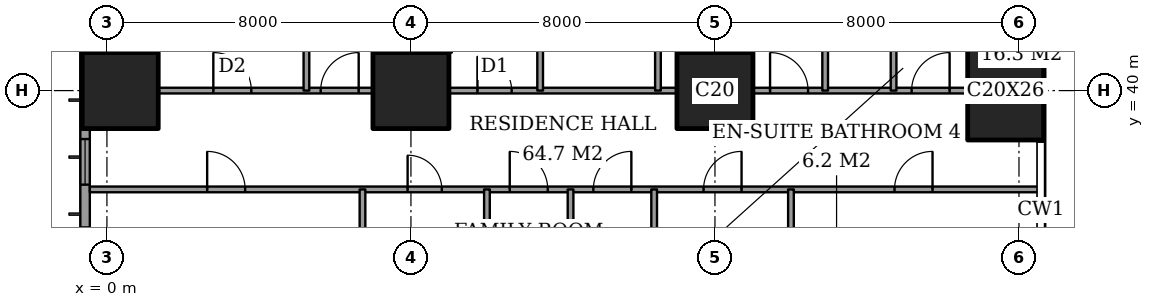
"""IFC4 building model, lengths in metres.
Left out: names, types, materials, properties, quantities, classifications, styles, units other than length and angle.
Written with IfcOpenShell. Run it as: python <this file> out.ifc"""

import sys

from ifc_helpers import new_model, si_unit, direction, frame, frame_2d, origin, origin_2d, place, context, subcontext, project, spatial, rectangle, extrude, element, fill, save


model = new_model("IFC4")
c1 = context("Model", 3, precision=1e-05, world=origin(), true_north=direction((0.0, 1.0)))
c2 = subcontext(c1, "Body", "Model", "MODEL_VIEW")
j1 = project(units=[si_unit("LENGTHUNIT", "METRE"), si_unit("PLANEANGLEUNIT", "RADIAN")], contexts=[c1])
p1 = place(None, origin())
s1 = spatial("IfcSite", under=j1, at=p1, CompositionType="ELEMENT")
p2 = place(p1, origin())
s2 = spatial("IfcBuilding", under=s1, at=p2, CompositionType="ELEMENT")
p3 = place(p2, frame((0.0, 0.0, 103.4)))
s3 = spatial("IfcBuildingStorey", under=s2, at=p3, CompositionType="ELEMENT", Elevation=103.4)
for number, where, z_axis, x_axis in (
    (1, (0.35, 40.0, 0.0), (0.0, 0.0, 1.0), (1.0, 0.0, 0.0)),
    (2, (8.0, 40.0, 0.0), (0.0, 0.0, 1.0), (1.0, 0.0, 0.0)),
    (3, (16.0, 40.0, 0.0), (0.0, 0.0, 1.0), (1.0, 0.0, 0.0)),
):
    element("IfcColumn", number, at=place(p3, frame(where, z_axis=z_axis, x_axis=x_axis)), inside=s3, PredefinedType="COLUMN", context=c2, shape_type="SweptSolid", body=[
        extrude(rectangle(XDim=2.0, YDim=2.0, at=origin_2d()), origin(), (0.0, 0.0, 1.0), 3.6),
    ])
p4 = place(p3, frame((23.65, 40.0, 0.0), z_axis=(0.0, 0.0, 1.0), x_axis=(1.0, 0.0, 0.0)))
e4 = element("IfcColumn", 4, at=p4, inside=s3, PredefinedType="COLUMN", context=c2, shape_type="SweptSolid", body=[
    extrude(rectangle(XDim=2.0, YDim=2.6, at=origin_2d()), origin(), (0.0, 0.0, 1.0), 3.6),
])
p5 = place(p3, frame((-0.575, 44.825, 0.0), z_axis=(0.0, 0.0, 1.0), x_axis=(0.0, -1.0, 0.0)))
e5 = element("IfcWall", 5, at=p5, inside=s3, PredefinedType="SOLIDWALL", context=c2, shape_type="SweptSolid", body=[
    extrude(rectangle(XDim=41.65, YDim=0.25, at=frame_2d((20.825, 0.0))), origin(), (0.0, 0.0, 1.0), 3.6),
])
p6 = place(p5, frame((0.775, 0.0, 0.4)))
e6 = element("IfcOpeningElement", 6, at=p6, cuts=e5, PredefinedType="OPENING", context=c2, shape_type="SweptSolid", body=[
    extrude(rectangle(XDim=2.4, YDim=2.2, at=frame_2d((1.2, 1.1))), frame((0.0, 0.135, 0.0), z_axis=(0.0, -1.0, 0.0), x_axis=(1.0, 0.0, 0.0)), (0.0, 0.0, 1.0), 0.27),
])
p7 = place(p5, frame((6.1, 0.0, 0.4)))
e7 = element("IfcOpeningElement", 7, at=p7, cuts=e5, PredefinedType="OPENING", context=c2, shape_type="SweptSolid", body=[
    extrude(rectangle(XDim=1.2, YDim=2.2, at=frame_2d((0.6, 1.1))), frame((0.0, 0.135, 0.0), z_axis=(0.0, -1.0, 0.0), x_axis=(1.0, 0.0, 0.0)), (0.0, 0.0, 1.0), 0.27),
])
p8 = place(p5, frame((8.425, 0.0, 0.4)))
e8 = element("IfcOpeningElement", 8, at=p8, cuts=e5, PredefinedType="OPENING", context=c2, shape_type="SweptSolid", body=[
    extrude(rectangle(XDim=2.4, YDim=2.2, at=frame_2d((1.2, 1.1))), frame((0.0, 0.135, 0.0), z_axis=(0.0, -1.0, 0.0), x_axis=(1.0, 0.0, 0.0)), (0.0, 0.0, 1.0), 0.27),
])
p9 = place(p5, frame((15.625, 0.0, 0.4)))
e9 = element("IfcOpeningElement", 9, at=p9, cuts=e5, PredefinedType="OPENING", context=c2, shape_type="SweptSolid", body=[
    extrude(rectangle(XDim=2.4, YDim=2.2, at=frame_2d((1.2, 1.1))), frame((0.0, 0.135, 0.0), z_axis=(0.0, -1.0, 0.0), x_axis=(1.0, 0.0, 0.0)), (0.0, 0.0, 1.0), 0.27),
])
p10 = place(p5, frame((23.625, 0.0, 0.4)))
e10 = element("IfcOpeningElement", 10, at=p10, cuts=e5, PredefinedType="OPENING", context=c2, shape_type="SweptSolid", body=[
    extrude(rectangle(XDim=2.4, YDim=2.2, at=frame_2d((1.2, 1.1))), frame((0.0, 0.135, 0.0), z_axis=(0.0, -1.0, 0.0), x_axis=(1.0, 0.0, 0.0)), (0.0, 0.0, 1.0), 0.27),
])
p11 = place(p5, frame((30.725, 0.0, 0.4)))
e11 = element("IfcOpeningElement", 11, at=p11, cuts=e5, PredefinedType="OPENING", context=c2, shape_type="SweptSolid", body=[
    extrude(rectangle(XDim=2.4, YDim=2.2, at=frame_2d((1.2, 1.1))), frame((0.0, 0.135, 0.0), z_axis=(0.0, -1.0, 0.0), x_axis=(1.0, 0.0, 0.0)), (0.0, 0.0, 1.0), 0.27),
])
p12 = place(p5, frame((34.325, 0.0, 0.4)))
e12 = element("IfcOpeningElement", 12, at=p12, cuts=e5, PredefinedType="OPENING", context=c2, shape_type="SweptSolid", body=[
    extrude(rectangle(XDim=1.2, YDim=2.2, at=frame_2d((0.6, 1.1))), frame((0.0, 0.135, 0.0), z_axis=(0.0, -1.0, 0.0), x_axis=(1.0, 0.0, 0.0)), (0.0, 0.0, 1.0), 0.27),
])
p13 = place(p5, frame((38.475, 0.0, 0.4)))
e13 = element("IfcOpeningElement", 13, at=p13, cuts=e5, PredefinedType="OPENING", context=c2, shape_type="SweptSolid", body=[
    extrude(rectangle(XDim=2.4, YDim=2.2, at=frame_2d((1.2, 1.1))), frame((0.0, 0.135, 0.0), z_axis=(0.0, -1.0, 0.0), x_axis=(1.0, 0.0, 0.0)), (0.0, 0.0, 1.0), 0.27),
])
p14 = place(p3, frame((-0.45, 37.4, 0.0), z_axis=(0.0, 0.0, 1.0), x_axis=(1.0, 0.0, 0.0)))
e14 = element("IfcWall", 14, at=p14, inside=s3, PredefinedType="PARTITIONING", context=c2, shape_type="SweptSolid", body=[
    extrude(rectangle(XDim=25.011, YDim=0.15, at=frame_2d((12.505, 0.0))), origin(), (0.0, 0.0, 1.0), 3.35),
])
p15 = place(p14, frame((13.25, 0.0, 0.0)))
e15 = element("IfcOpeningElement", 15, at=p15, cuts=e14, PredefinedType="OPENING", context=c2, shape_type="SweptSolid", body=[
    extrude(rectangle(XDim=1.0, YDim=2.1, at=frame_2d((0.5, 1.05))), frame((0.0, 0.085, 0.0), z_axis=(0.0, -1.0, 0.0), x_axis=(1.0, 0.0, 0.0)), (0.0, 0.0, 1.0), 0.17),
])
p16 = place(p14, frame((3.087, 0.0, 0.0)))
e16 = element("IfcOpeningElement", 16, at=p16, cuts=e14, PredefinedType="OPENING", context=c2, shape_type="SweptSolid", body=[
    extrude(rectangle(XDim=1.0, YDim=2.1, at=frame_2d((0.5, 1.05))), frame((0.0, 0.085, 0.0), z_axis=(0.0, -1.0, 0.0), x_axis=(1.0, 0.0, 0.0)), (0.0, 0.0, 1.0), 0.17),
])
p17 = place(p14, frame((8.363, 0.0, 0.0)))
e17 = element("IfcOpeningElement", 17, at=p17, cuts=e14, PredefinedType="OPENING", context=c2, shape_type="SweptSolid", body=[
    extrude(rectangle(XDim=0.9, YDim=2.1, at=frame_2d((0.45, 1.05))), frame((0.0, 0.085, 0.0), z_axis=(0.0, -1.0, 0.0), x_axis=(1.0, 0.0, 0.0)), (0.0, 0.0, 1.0), 0.17),
])
p18 = place(p14, frame((11.05, 0.0, 0.0)))
e18 = element("IfcOpeningElement", 18, at=p18, cuts=e14, PredefinedType="OPENING", context=c2, shape_type="SweptSolid", body=[
    extrude(rectangle(XDim=1.0, YDim=2.1, at=frame_2d((0.5, 1.05))), frame((0.0, 0.085, 0.0), z_axis=(0.0, -1.0, 0.0), x_axis=(1.0, 0.0, 0.0)), (0.0, 0.0, 1.0), 0.17),
])
p19 = place(p14, frame((16.15, 0.0, 0.0)))
e19 = element("IfcOpeningElement", 19, at=p19, cuts=e14, PredefinedType="OPENING", context=c2, shape_type="SweptSolid", body=[
    extrude(rectangle(XDim=1.0, YDim=2.1, at=frame_2d((0.5, 1.05))), frame((0.0, 0.085, 0.0), z_axis=(0.0, -1.0, 0.0), x_axis=(1.0, 0.0, 0.0)), (0.0, 0.0, 1.0), 0.17),
])
p20 = place(p14, frame((21.175, 0.0, 0.0)))
e20 = element("IfcOpeningElement", 20, at=p20, cuts=e14, PredefinedType="OPENING", context=c2, shape_type="SweptSolid", body=[
    extrude(rectangle(XDim=1.0, YDim=2.1, at=frame_2d((0.5, 1.05))), frame((0.0, 0.085, 0.0), z_axis=(0.0, -1.0, 0.0), x_axis=(1.0, 0.0, 0.0)), (0.0, 0.0, 1.0), 0.17),
])
p21 = place(p3, frame((1.35, 40.0, 0.0), z_axis=(0.0, 0.0, 1.0), x_axis=(1.0, 0.0, 0.0)))
e21 = element("IfcWall", 21, at=p21, inside=s3, PredefinedType="PARTITIONING", context=c2, shape_type="SweptSolid", body=[
    extrude(rectangle(XDim=5.65, YDim=0.15, at=frame_2d((2.825, 0.0))), origin(), (0.0, 0.0, 1.0), 3.35),
])
p22 = place(p21, frame((1.45, 0.0, 0.0)))
e22 = element("IfcOpeningElement", 22, at=p22, cuts=e21, PredefinedType="OPENING", context=c2, shape_type="SweptSolid", body=[
    extrude(rectangle(XDim=1.0, YDim=2.1, at=frame_2d((0.5, 1.05))), frame((0.0, 0.085, 0.0), z_axis=(0.0, -1.0, 0.0), x_axis=(1.0, 0.0, 0.0)), (0.0, 0.0, 1.0), 0.17),
])
p23 = place(p21, frame((4.275, 0.0, 0.0)))
e23 = element("IfcOpeningElement", 23, at=p23, cuts=e21, PredefinedType="OPENING", context=c2, shape_type="SweptSolid", body=[
    extrude(rectangle(XDim=1.0, YDim=2.1, at=frame_2d((0.5, 1.05))), frame((0.0, 0.085, 0.0), z_axis=(0.0, -1.0, 0.0), x_axis=(1.0, 0.0, 0.0)), (0.0, 0.0, 1.0), 0.17),
])
p24 = place(p3, frame((9.0, 40.0, 0.0), z_axis=(0.0, 0.0, 1.0), x_axis=(1.0, 0.0, 0.0)))
e24 = element("IfcWall", 24, at=p24, inside=s3, PredefinedType="PARTITIONING", context=c2, shape_type="SweptSolid", body=[
    extrude(rectangle(XDim=6.0, YDim=0.15, at=frame_2d((3.0, 0.0))), origin(), (0.0, 0.0, 1.0), 3.35),
])
p25 = place(p24, frame((0.75, 0.0, 0.0)))
e25 = element("IfcOpeningElement", 25, at=p25, cuts=e24, PredefinedType="OPENING", context=c2, shape_type="SweptSolid", body=[
    extrude(rectangle(XDim=0.9, YDim=2.1, at=frame_2d((0.45, 1.05))), frame((0.0, 0.085, 0.0), z_axis=(0.0, -1.0, 0.0), x_axis=(1.0, 0.0, 0.0)), (0.0, 0.0, 1.0), 0.17),
])
p26 = place(p3, frame((17.0, 40.0, 0.0), z_axis=(0.0, 0.0, 1.0), x_axis=(1.0, 0.0, 0.0)))
e26 = element("IfcWall", 26, at=p26, inside=s3, PredefinedType="PARTITIONING", context=c2, shape_type="SweptSolid", body=[
    extrude(rectangle(XDim=5.65, YDim=0.15, at=frame_2d((2.825, 0.0))), origin(), (0.0, 0.0, 1.0), 3.35),
])
p27 = place(p26, frame((0.45, 0.0, 0.0)))
e27 = element("IfcOpeningElement", 27, at=p27, cuts=e26, PredefinedType="OPENING", context=c2, shape_type="SweptSolid", body=[
    extrude(rectangle(XDim=1.0, YDim=2.1, at=frame_2d((0.5, 1.05))), frame((0.0, 0.085, 0.0), z_axis=(0.0, -1.0, 0.0), x_axis=(1.0, 0.0, 0.0)), (0.0, 0.0, 1.0), 0.17),
])
p28 = place(p26, frame((4.175, 0.0, 0.0)))
e28 = element("IfcOpeningElement", 28, at=p28, cuts=e26, PredefinedType="OPENING", context=c2, shape_type="SweptSolid", body=[
    extrude(rectangle(XDim=1.0, YDim=2.1, at=frame_2d((0.5, 1.05))), frame((0.0, 0.085, 0.0), z_axis=(0.0, -1.0, 0.0), x_axis=(1.0, 0.0, 0.0)), (0.0, 0.0, 1.0), 0.17),
])
p29 = place(p3, frame((5.25, 40.0, 0.0), z_axis=(0.0, 0.0, 1.0), x_axis=(0.0, 1.0, 0.0)))
e29 = element("IfcWall", 29, at=p29, inside=s3, PredefinedType="PARTITIONING", context=c2, shape_type="SweptSolid", body=[
    extrude(rectangle(XDim=8.45, YDim=0.15, at=frame_2d((4.225, 0.0))), origin(), (0.0, 0.0, 1.0), 3.35),
])
p30 = place(p3, frame((6.725, 33.2, 0.0), z_axis=(0.0, 0.0, 1.0), x_axis=(0.0, 1.0, 0.0)))
e30 = element("IfcWall", 30, at=p30, inside=s3, PredefinedType="PARTITIONING", context=c2, shape_type="SweptSolid", body=[
    extrude(rectangle(XDim=4.2, YDim=0.15, at=frame_2d((2.1, 0.0))), origin(), (0.0, 0.0, 1.0), 3.35),
])
p31 = place(p3, frame((10.0, 28.0, 0.0), z_axis=(0.0, 0.0, 1.0), x_axis=(0.0, 1.0, 0.0)))
e31 = element("IfcWall", 31, at=p31, inside=s3, PredefinedType="PARTITIONING", context=c2, shape_type="SweptSolid", body=[
    extrude(rectangle(XDim=9.4, YDim=0.15, at=frame_2d((4.7, 0.0))), origin(), (0.0, 0.0, 1.0), 3.35),
])
p32 = place(p31, frame((0.5, 0.0, 0.0)))
e32 = element("IfcOpeningElement", 32, at=p32, cuts=e31, PredefinedType="OPENING", context=c2, shape_type="SweptSolid", body=[
    extrude(rectangle(XDim=1.0, YDim=2.1, at=frame_2d((0.5, 1.05))), frame((0.0, 0.085, 0.0), z_axis=(0.0, -1.0, 0.0), x_axis=(1.0, 0.0, 0.0)), (0.0, 0.0, 1.0), 0.17),
])
p33 = place(p3, frame((11.4, 40.0, 0.0), z_axis=(0.0, 0.0, 1.0), x_axis=(0.0, 1.0, 0.0)))
e33 = element("IfcWall", 33, at=p33, inside=s3, PredefinedType="PARTITIONING", context=c2, shape_type="SweptSolid", body=[
    extrude(rectangle(XDim=8.45, YDim=0.15, at=frame_2d((4.225, 0.0))), origin(), (0.0, 0.0, 1.0), 3.35),
])
for number, where, z_axis, x_axis in (
    (34, (12.2, 30.0, 0.0), (0.0, 0.0, 1.0), (0.0, 1.0, 0.0)),
    (35, (14.4, 30.0, 0.0), (0.0, 0.0, 1.0), (0.0, 1.0, 0.0)),
):
    element("IfcWall", number, at=place(p3, frame(where, z_axis=z_axis, x_axis=x_axis)), inside=s3, PredefinedType="PARTITIONING", context=c2, shape_type="SweptSolid", body=[
        extrude(rectangle(XDim=7.4, YDim=0.15, at=frame_2d((3.7, 0.0))), origin(), (0.0, 0.0, 1.0), 3.35),
    ])
p34 = place(p3, frame((14.5, 40.0, 0.0), z_axis=(0.0, 0.0, 1.0), x_axis=(0.0, 1.0, 0.0)))
e36 = element("IfcWall", 36, at=p34, inside=s3, PredefinedType="PARTITIONING", context=c2, shape_type="SweptSolid", body=[
    extrude(rectangle(XDim=8.45, YDim=0.15, at=frame_2d((4.225, 0.0))), origin(), (0.0, 0.0, 1.0), 3.35),
])
p35 = place(p34, frame((3.775, 0.0, 0.0)))
e37 = element("IfcOpeningElement", 37, at=p35, cuts=e36, PredefinedType="OPENING", context=c2, shape_type="SweptSolid", body=[
    extrude(rectangle(XDim=0.9, YDim=2.1, at=frame_2d((0.45, 1.05))), frame((0.0, 0.085, 0.0), z_axis=(0.0, -1.0, 0.0), x_axis=(1.0, 0.0, 0.0)), (0.0, 0.0, 1.0), 0.17),
])
p36 = place(p3, frame((18.0, 28.0, 0.0), z_axis=(0.0, 0.0, 1.0), x_axis=(0.0, 1.0, 0.0)))
e38 = element("IfcWall", 38, at=p36, inside=s3, PredefinedType="PARTITIONING", context=c2, shape_type="SweptSolid", body=[
    extrude(rectangle(XDim=9.4, YDim=0.15, at=frame_2d((4.7, 0.0))), origin(), (0.0, 0.0, 1.0), 3.35),
])
p37 = place(p36, frame((0.55, 0.0, 0.0)))
e39 = element("IfcOpeningElement", 39, at=p37, cuts=e38, PredefinedType="OPENING", context=c2, shape_type="SweptSolid", body=[
    extrude(rectangle(XDim=0.9, YDim=2.1, at=frame_2d((0.45, 1.05))), frame((0.0, 0.085, 0.0), z_axis=(0.0, -1.0, 0.0), x_axis=(1.0, 0.0, 0.0)), (0.0, 0.0, 1.0), 0.17),
])
p38 = place(p3, frame((18.9, 40.0, 0.0), z_axis=(0.0, 0.0, 1.0), x_axis=(0.0, 1.0, 0.0)))
e40 = element("IfcWall", 40, at=p38, inside=s3, PredefinedType="PARTITIONING", context=c2, shape_type="SweptSolid", body=[
    extrude(rectangle(XDim=8.45, YDim=0.15, at=frame_2d((4.225, 0.0))), origin(), (0.0, 0.0, 1.0), 3.35),
])
p39 = place(p3, frame((20.7, 40.0, 0.0), z_axis=(0.0, 0.0, 1.0), x_axis=(0.0, 1.0, 0.0)))
e41 = element("IfcWall", 41, at=p39, inside=s3, PredefinedType="PARTITIONING", context=c2, shape_type="SweptSolid", body=[
    extrude(rectangle(XDim=8.45, YDim=0.15, at=frame_2d((4.225, 0.0))), origin(), (0.0, 0.0, 1.0), 3.35),
])
p40 = place(p39, frame((3.775, 0.0, 0.0)))
e42 = element("IfcOpeningElement", 42, at=p40, cuts=e41, PredefinedType="OPENING", context=c2, shape_type="SweptSolid", body=[
    extrude(rectangle(XDim=0.9, YDim=2.1, at=frame_2d((0.45, 1.05))), frame((0.0, 0.085, 0.0), z_axis=(0.0, -1.0, 0.0), x_axis=(1.0, 0.0, 0.0)), (0.0, 0.0, 1.0), 0.17),
])
p41 = place(p7, origin())
e43 = element("IfcWindow", 43, at=p41, inside=s3, PartitioningType="SINGLE_PANEL", PredefinedType="WINDOW", context=c2, shape_type="SweptSolid", body=[
    extrude(rectangle(XDim=1.2, YDim=2.2, at=frame_2d((0.6, 1.1))), frame((0.0, 0.03, 0.0), z_axis=(0.0, -1.0, 0.0), x_axis=(1.0, 0.0, 0.0)), (0.0, 0.0, 1.0), 0.06),
])
fill(e7, e43)
p42 = place(p22, origin())
e44 = element("IfcDoor", 44, at=p42, inside=s3, OperationType="SINGLE_SWING_RIGHT", PredefinedType="DOOR", context=c2, shape_type="SweptSolid", body=[
    extrude(rectangle(XDim=1.0, YDim=2.1, at=frame_2d((0.5, 1.05))), frame((0.0, 0.025, 0.0), z_axis=(0.0, -1.0, 0.0), x_axis=(1.0, 0.0, 0.0)), (0.0, 0.0, 1.0), 0.05),
])
fill(e22, e44)
p43 = place(p23, origin())
e45 = element("IfcDoor", 45, at=p43, inside=s3, OperationType="SINGLE_SWING_LEFT", PredefinedType="DOOR", context=c2, shape_type="SweptSolid", body=[
    extrude(rectangle(XDim=1.0, YDim=2.1, at=frame_2d((0.5, 1.05))), frame((0.0, 0.025, 0.0), z_axis=(0.0, -1.0, 0.0), x_axis=(1.0, 0.0, 0.0)), (0.0, 0.0, 1.0), 0.05),
])
fill(e23, e45)
p44 = place(p25, origin())
e46 = element("IfcDoor", 46, at=p44, inside=s3, OperationType="SINGLE_SWING_RIGHT", PredefinedType="DOOR", context=c2, shape_type="SweptSolid", body=[
    extrude(rectangle(XDim=0.9, YDim=2.1, at=frame_2d((0.45, 1.05))), frame((0.0, 0.025, 0.0), z_axis=(0.0, -1.0, 0.0), x_axis=(1.0, 0.0, 0.0)), (0.0, 0.0, 1.0), 0.05),
])
fill(e25, e46)
p45 = place(p27, origin())
e47 = element("IfcDoor", 47, at=p45, inside=s3, OperationType="SINGLE_SWING_RIGHT", PredefinedType="DOOR", context=c2, shape_type="SweptSolid", body=[
    extrude(rectangle(XDim=1.0, YDim=2.1, at=frame_2d((0.5, 1.05))), frame((0.0, 0.025, 0.0), z_axis=(0.0, -1.0, 0.0), x_axis=(1.0, 0.0, 0.0)), (0.0, 0.0, 1.0), 0.05),
])
fill(e27, e47)
p46 = place(p28, origin())
e48 = element("IfcDoor", 48, at=p46, inside=s3, OperationType="SINGLE_SWING_LEFT", PredefinedType="DOOR", context=c2, shape_type="SweptSolid", body=[
    extrude(rectangle(XDim=1.0, YDim=2.1, at=frame_2d((0.5, 1.05))), frame((0.0, 0.025, 0.0), z_axis=(0.0, -1.0, 0.0), x_axis=(1.0, 0.0, 0.0)), (0.0, 0.0, 1.0), 0.05),
])
fill(e28, e48)
p47 = place(p15, origin())
e49 = element("IfcDoor", 49, at=p47, inside=s3, OperationType="SINGLE_SWING_LEFT", PredefinedType="DOOR", context=c2, shape_type="SweptSolid", body=[
    extrude(rectangle(XDim=1.0, YDim=2.1, at=frame_2d((0.5, 1.05))), frame((0.0, 0.025, 0.0), z_axis=(0.0, -1.0, 0.0), x_axis=(1.0, 0.0, 0.0)), (0.0, 0.0, 1.0), 0.05),
])
fill(e15, e49)
p48 = place(p16, origin())
e50 = element("IfcDoor", 50, at=p48, inside=s3, OperationType="SINGLE_SWING_RIGHT", PredefinedType="DOOR", context=c2, shape_type="SweptSolid", body=[
    extrude(rectangle(XDim=1.0, YDim=2.1, at=frame_2d((0.5, 1.05))), frame((0.0, 0.025, 0.0), z_axis=(0.0, -1.0, 0.0), x_axis=(1.0, 0.0, 0.0)), (0.0, 0.0, 1.0), 0.05),
])
fill(e16, e50)
p49 = place(p17, origin())
e51 = element("IfcDoor", 51, at=p49, inside=s3, OperationType="SINGLE_SWING_RIGHT", PredefinedType="DOOR", context=c2, shape_type="SweptSolid", body=[
    extrude(rectangle(XDim=0.9, YDim=2.1, at=frame_2d((0.45, 1.05))), frame((0.0, 0.025, 0.0), z_axis=(0.0, -1.0, 0.0), x_axis=(1.0, 0.0, 0.0)), (0.0, 0.0, 1.0), 0.05),
])
fill(e17, e51)
p50 = place(p18, origin())
e52 = element("IfcDoor", 52, at=p50, inside=s3, OperationType="SINGLE_SWING_RIGHT", PredefinedType="DOOR", context=c2, shape_type="SweptSolid", body=[
    extrude(rectangle(XDim=1.0, YDim=2.1, at=frame_2d((0.5, 1.05))), frame((0.0, 0.025, 0.0), z_axis=(0.0, -1.0, 0.0), x_axis=(1.0, 0.0, 0.0)), (0.0, 0.0, 1.0), 0.05),
])
fill(e18, e52)
p51 = place(p19, origin())
e53 = element("IfcDoor", 53, at=p51, inside=s3, OperationType="SINGLE_SWING_LEFT", PredefinedType="DOOR", context=c2, shape_type="SweptSolid", body=[
    extrude(rectangle(XDim=1.0, YDim=2.1, at=frame_2d((0.5, 1.05))), frame((0.0, 0.025, 0.0), z_axis=(0.0, -1.0, 0.0), x_axis=(1.0, 0.0, 0.0)), (0.0, 0.0, 1.0), 0.05),
])
fill(e19, e53)
p52 = place(p20, origin())
e54 = element("IfcDoor", 54, at=p52, inside=s3, OperationType="SINGLE_SWING_LEFT", PredefinedType="DOOR", context=c2, shape_type="SweptSolid", body=[
    extrude(rectangle(XDim=1.0, YDim=2.1, at=frame_2d((0.5, 1.05))), frame((0.0, 0.025, 0.0), z_axis=(0.0, -1.0, 0.0), x_axis=(1.0, 0.0, 0.0)), (0.0, 0.0, 1.0), 0.05),
])
fill(e20, e54)
save(model, sys.argv[1])
